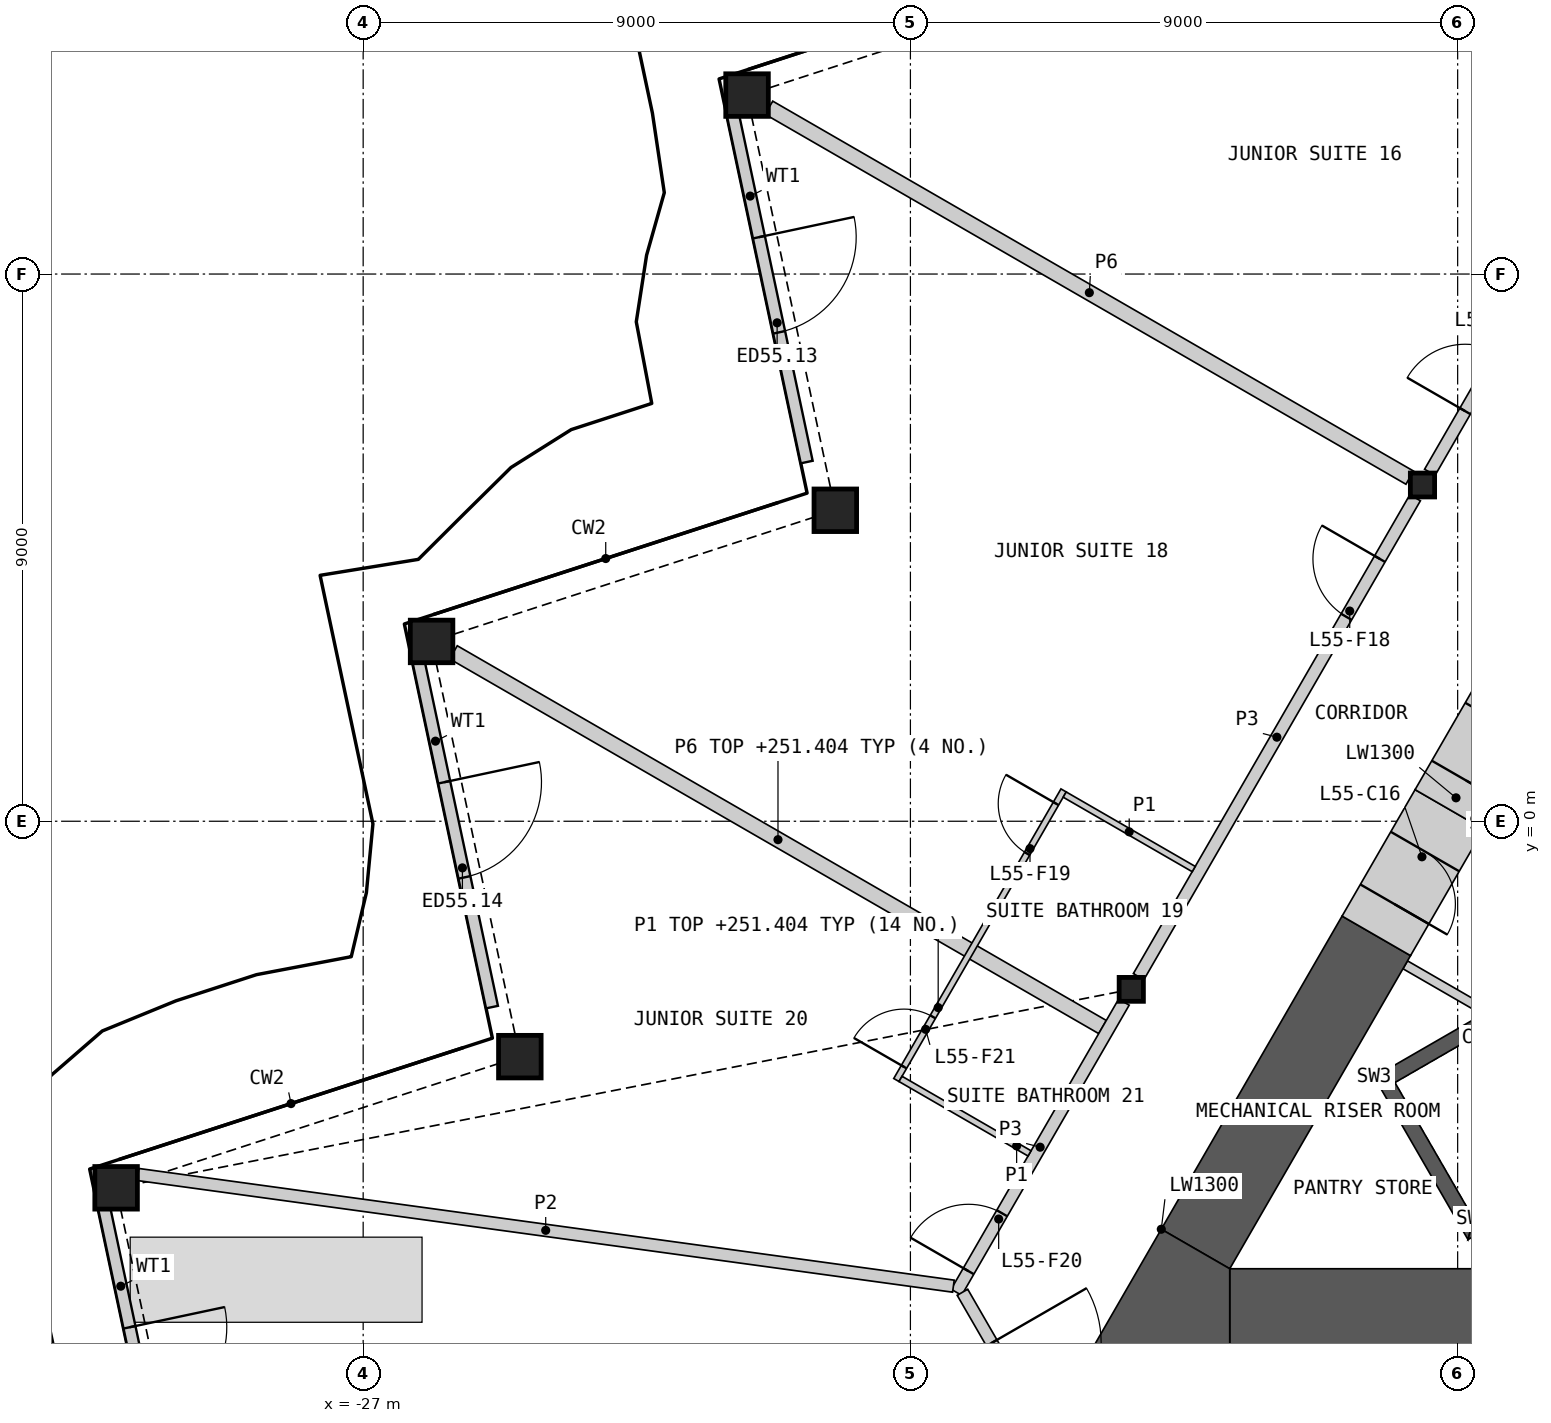
"""IFC4 building model, lengths in metres.
Left out: names, types, materials, properties, quantities, classifications, styles, units other than length and angle.
Written with IfcOpenShell. Run it as: python <this file> out.ifc"""

import sys

from ifc_helpers import new_model, si_unit, direction, frame, frame_2d, origin, origin_2d, place, context, subcontext, project, spatial, polyline, rectangle, hollow_rectangle, i_section, outline, extrude, element, fill, save


model = new_model("IFC4")
c1 = context("Model", 3, precision=1e-05, world=origin(), true_north=direction((0.0, 1.0)))
c2 = subcontext(c1, "Body", "Model", "MODEL_VIEW")
j1 = project(units=[si_unit("LENGTHUNIT", "METRE"), si_unit("PLANEANGLEUNIT", "RADIAN")], contexts=[c1])
p1 = place(None, origin())
s1 = spatial("IfcSite", under=j1, at=p1, CompositionType="ELEMENT")
p2 = place(p1, origin())
s2 = spatial("IfcBuilding", under=s1, at=p2, CompositionType="ELEMENT")
p3 = place(p2, frame((0.0, 0.0, 249.0)))
s3 = spatial("IfcBuildingStorey", under=s2, at=p3, CompositionType="ELEMENT", Elevation=249.0)
for number, where, z_axis, x_axis in (
    (1, (-20.687, 11.943, 0.0), (0.0, 0.0, 1.0), (1.0, 0.0, 0.0)),
    (2, (-19.235, 5.115, 0.0), (0.0, 0.0, 1.0), (1.0, 0.0, 0.0)),
    (3, (-25.875, 2.957, 0.0), (0.0, 0.0, 1.0), (1.0, 0.0, 0.0)),
    (4, (-24.423, -3.872, 0.0), (0.0, 0.0, 1.0), (1.0, 0.0, 0.0)),
    (5, (-31.063, -6.029, 0.0), (0.0, 0.0, 1.0), (1.0, 0.0, 0.0)),
):
    element("IfcColumn", number, at=place(p3, frame(where, z_axis=z_axis, x_axis=x_axis)), inside=s3, PredefinedType="COLUMN", context=c2, shape_type="SweptSolid", body=[
        extrude(hollow_rectangle(XDim=0.7, YDim=0.7, WallThickness=0.045, at=origin_2d()), origin(), (0.0, 0.0, 1.0), 3.6),
    ])
for number, where, z_axis, x_axis in (
    (6, (-9.578, 5.53, 0.0), (0.0, 0.0, 1.0), (1.0, 0.0, 0.0)),
    (7, (-14.368, -2.765, 0.0), (0.0, 0.0, 1.0), (1.0, 0.0, 0.0)),
):
    element("IfcColumn", number, at=place(p3, frame(where, z_axis=z_axis, x_axis=x_axis)), inside=s3, PredefinedType="COLUMN", context=c2, shape_type="SweptSolid", body=[
        extrude(i_section(OverallWidth=0.399, OverallDepth=0.393, WebThickness=0.023, FlangeThickness=0.037, at=origin_2d()), origin(), (0.0, 0.0, 1.0), 3.6),
    ])
p4 = place(p3, frame((-20.945, 11.74, 0.0), z_axis=(0.0, 0.0, 1.0), x_axis=(0.207920947907, -0.978145633033, 0.0)))
e8 = element("IfcWall", 8, at=p4, inside=s3, PredefinedType="SOLIDWALL", context=c2, shape_type="SweptSolid", body=[
    extrude(rectangle(XDim=5.963, YDim=0.2, at=frame_2d((2.981, 0.0))), origin(), (0.0, 0.0, 1.0), 2.701),
])
p5 = place(p4, frame((2.181, 0.0, 0.0)))
e9 = element("IfcOpeningElement", 9, at=p5, cuts=e8, PredefinedType="OPENING", context=c2, shape_type="SweptSolid", body=[
    extrude(rectangle(XDim=1.6, YDim=2.4, at=frame_2d((0.8, 1.2))), frame((0.0, 0.11, 0.0), z_axis=(0.0, -1.0, 0.0), x_axis=(1.0, 0.0, 0.0)), (0.0, 0.0, 1.0), 0.22),
])
p6 = place(p3, frame((-26.121, 2.775, 0.0), z_axis=(0.0, 0.0, 1.0), x_axis=(0.207881772083, -0.978153959679, 0.0)))
e10 = element("IfcWall", 10, at=p6, inside=s3, PredefinedType="SOLIDWALL", context=c2, shape_type="SweptSolid", body=[
    extrude(rectangle(XDim=5.963, YDim=0.2, at=frame_2d((2.981, 0.0))), origin(), (0.0, 0.0, 1.0), 2.701),
])
p7 = place(p6, frame((2.181, 0.0, 0.0)))
e11 = element("IfcOpeningElement", 11, at=p7, cuts=e10, PredefinedType="OPENING", context=c2, shape_type="SweptSolid", body=[
    extrude(rectangle(XDim=1.6, YDim=2.4, at=frame_2d((0.8, 1.2))), frame((0.0, 0.11, 0.0), z_axis=(0.0, -1.0, 0.0), x_axis=(1.0, 0.0, 0.0)), (0.0, 0.0, 1.0), 0.22),
])
p8 = place(p3, frame((-31.296, -6.189, 0.0), z_axis=(0.0, 0.0, 1.0), x_axis=(0.207920947907, -0.978145633033, 0.0)))
e12 = element("IfcWall", 12, at=p8, inside=s3, PredefinedType="SOLIDWALL", context=c2, shape_type="SweptSolid", body=[
    extrude(rectangle(XDim=5.963, YDim=0.2, at=frame_2d((2.981, 0.0))), origin(), (0.0, 0.0, 1.0), 2.701),
])
p9 = place(p8, frame((2.181, 0.0, 0.0)))
e13 = element("IfcOpeningElement", 13, at=p9, cuts=e12, PredefinedType="OPENING", context=c2, shape_type="SweptSolid", body=[
    extrude(rectangle(XDim=1.6, YDim=2.4, at=frame_2d((0.8, 1.2))), frame((0.0, 0.11, 0.0), z_axis=(0.0, -1.0, 0.0), x_axis=(1.0, 0.0, 0.0)), (0.0, 0.0, 1.0), 0.22),
])
p10 = place(p3, origin())
e14 = element("IfcWall", 14, at=p10, inside=s3, PredefinedType="SHEAR", context=c2, shape_type="SweptSolid", body=[
    extrude(outline(polyline([(-5.307, -1.281), (-10.374, -4.206), (-10.032, -4.298), (-5.182, -1.498), (-5.307, -1.281)])), origin(), (0.0, 0.0, 1.0), 3.25),
])
p11 = place(p3, origin())
e15 = element("IfcWall", 15, at=p11, inside=s3, PredefinedType="SHEAR", context=c2, shape_type="SweptSolid", body=[
    extrude(outline(polyline([(-10.374, -4.206), (-8.83, -6.881), (-8.738, -6.539), (-10.032, -4.298), (-10.374, -4.206)])), origin(), (0.0, 0.0, 1.0), 3.25),
])
p12 = place(p3, origin())
e16 = element("IfcWall", 16, at=p12, inside=s3, PredefinedType="SHEAR", context=c2, shape_type="SweptSolid", body=[
    extrude(outline(polyline([(-8.738, -6.539), (-8.83, -6.881), (-3.763, -3.956), (-3.888, -3.739), (-8.738, -6.539)])), origin(), (0.0, 0.0, 1.0), 3.25),
])
p13 = place(p3, frame((-9.862, -2.361, 0.0), z_axis=(0.0, 0.0, 1.0), x_axis=(0.865990094875, -0.500061151839, 0.0)))
e17 = element("IfcWall", 17, at=p13, inside=s3, PredefinedType="PARTITIONING", context=c2, shape_type="SweptSolid", body=[
    extrude(rectangle(XDim=1.56, YDim=0.15, at=frame_2d((0.78, 0.0))), origin(), (0.0, 0.0, 1.0), 3.25),
])
p14 = place(p3, frame((-12.748, -8.01, 0.0), z_axis=(0.0, 0.0, 1.0), x_axis=(1.0, 0.0, 0.0)))
e18 = element("IfcWall", 18, at=p14, inside=s3, PredefinedType="SHEAR", context=c2, shape_type="SweptSolid", body=[
    extrude(rectangle(XDim=4.26, YDim=1.3, at=frame_2d((2.13, 0.0))), origin(), (0.0, 0.0, 1.0), 3.25),
])
p15 = place(p3, frame((-10.338, -1.885, 0.0), z_axis=(0.0, 0.0, 1.0), x_axis=(-0.499975944838, -0.866039291593, 0.0)))
e19 = element("IfcWall", 19, at=p15, inside=s3, PredefinedType="SHEAR", context=c2, shape_type="SweptSolid", body=[
    extrude(rectangle(XDim=5.947, YDim=1.3, at=frame_2d((2.974, 0.0))), origin(), (0.0, 0.0, 1.0), 3.25),
])
p16 = place(p3, origin())
e20 = element("IfcWall", 20, at=p16, inside=s3, PredefinedType="SHEAR", context=c2, shape_type="SweptSolid", body=[
    extrude(outline(polyline([(-13.874, -6.71), (-12.748, -7.36), (-12.748, -8.66), (-15.0, -8.66), (-13.874, -6.71)])), origin(), (0.0, 0.0, 1.0), 3.25),
])
p17 = place(p3, frame((-9.137, 0.195, 0.0), z_axis=(0.0, 0.0, 1.0), x_axis=(-0.500009943768, -0.866019662671, 0.0)))
e21 = element("IfcWall", 21, at=p17, inside=s3, PredefinedType="SHEAR", context=c2, shape_type="SweptSolid", body=[
    extrude(rectangle(XDim=2.401, YDim=1.3, at=frame_2d((1.201, 0.0))), origin(), (0.0, 0.0, 1.0), 3.25),
])
p18 = place(p17, frame((0.8, 0.0, 0.0)))
e22 = element("IfcOpeningElement", 22, at=p18, cuts=e21, PredefinedType="OPENING", context=c2, shape_type="SweptSolid", body=[
    extrude(rectangle(XDim=1.0, YDim=2.1, at=frame_2d((0.5, 1.05))), frame((0.0, 0.66, 0.0), z_axis=(0.0, -1.0, 0.0), x_axis=(1.0, 0.0, 0.0)), (0.0, 0.0, 1.0), 1.32),
])
p19 = place(p3, frame((-8.037, 2.1, 0.0), z_axis=(0.0, 0.0, 1.0), x_axis=(-0.50002983664, -0.866008176907, 0.0)))
e23 = element("IfcWall", 23, at=p19, inside=s3, PredefinedType="SHEAR", context=c2, shape_type="SweptSolid", body=[
    extrude(rectangle(XDim=2.2, YDim=1.3, at=frame_2d((1.1, 0.0))), origin(), (0.0, 0.0, 1.0), 3.25),
])
p20 = place(p19, frame((0.55, 0.0, 0.0)))
e24 = element("IfcOpeningElement", 24, at=p20, cuts=e23, PredefinedType="OPENING", context=c2, shape_type="SweptSolid", body=[
    extrude(rectangle(XDim=1.1, YDim=2.1, at=frame_2d((0.55, 1.05))), frame((0.0, 0.66, 0.0), z_axis=(0.0, -1.0, 0.0), x_axis=(1.0, 0.0, 0.0)), (0.0, 0.0, 1.0), 1.32),
])
p21 = place(p3, frame((-25.515, 2.778, 0.0), z_axis=(0.0, 0.0, 1.0), x_axis=(0.866019666699, -0.500009936792, 0.0)))
e25 = element("IfcWall", 25, at=p21, inside=s3, PredefinedType="PARTITIONING", context=c2, shape_type="SweptSolid", body=[
    extrude(rectangle(XDim=12.325, YDim=0.25, at=frame_2d((6.163, 0.0))), origin(), (0.0, 0.0, 1.0), 2.404),
])
p22 = place(p3, frame((-20.327, 11.736, 0.0), z_axis=(0.0, 0.0, 1.0), x_axis=(0.866024549986, -0.50000147882, 0.0)))
e26 = element("IfcWall", 26, at=p22, inside=s3, PredefinedType="PARTITIONING", context=c2, shape_type="SweptSolid", body=[
    extrude(rectangle(XDim=12.169, YDim=0.25, at=frame_2d((6.084, 0.0))), origin(), (0.0, 0.0, 1.0), 2.404),
])
p23 = place(p3, frame((-14.247, -2.556, 0.0), z_axis=(0.0, 0.0, 1.0), x_axis=(0.49998193945, 0.866035830797, 0.0)))
e27 = element("IfcWall", 27, at=p23, inside=s3, PredefinedType="PARTITIONING", context=c2, shape_type="SweptSolid", body=[
    extrude(rectangle(XDim=9.094, YDim=0.2, at=frame_2d((4.547, 0.0))), origin(), (0.0, 0.0, 1.0), 3.25),
])
p24 = place(p23, frame((6.833, 0.0, 0.0)))
e28 = element("IfcOpeningElement", 28, at=p24, cuts=e27, PredefinedType="OPENING", context=c2, shape_type="SweptSolid", body=[
    extrude(rectangle(XDim=1.1, YDim=2.1, at=frame_2d((0.55, 1.05))), frame((0.0, 0.11, 0.0), z_axis=(0.0, -1.0, 0.0), x_axis=(1.0, 0.0, 0.0)), (0.0, 0.0, 1.0), 0.22),
])
p25 = place(p3, frame((-9.458, 5.74, 0.0), z_axis=(0.0, 0.0, 1.0), x_axis=(0.50000207303, 0.866024206917, 0.0)))
e29 = element("IfcWall", 29, at=p25, inside=s3, PredefinedType="PARTITIONING", context=c2, shape_type="SweptSolid", body=[
    extrude(rectangle(XDim=9.095, YDim=0.2, at=frame_2d((4.547, 0.0))), origin(), (0.0, 0.0, 1.0), 3.25),
])
p26 = place(p25, frame((1.162, 0.0, 0.0)))
e30 = element("IfcOpeningElement", 30, at=p26, cuts=e29, PredefinedType="OPENING", context=c2, shape_type="SweptSolid", body=[
    extrude(rectangle(XDim=1.1, YDim=2.1, at=frame_2d((0.55, 1.05))), frame((0.0, 0.11, 0.0), z_axis=(0.0, -1.0, 0.0), x_axis=(1.0, 0.0, 0.0)), (0.0, 0.0, 1.0), 0.22),
])
p27 = place(p3, frame((-17.244, -7.747, 0.0), z_axis=(0.0, 0.0, 1.0), x_axis=(0.500017753321, 0.866015153657, 0.0)))
e31 = element("IfcWall", 31, at=p27, inside=s3, PredefinedType="PARTITIONING", context=c2, shape_type="SweptSolid", body=[
    extrude(rectangle(XDim=5.51, YDim=0.2, at=frame_2d((2.755, 0.0))), origin(), (0.0, 0.0, 1.0), 3.25),
])
p28 = place(p27, frame((0.401, 0.0, 0.0)))
e32 = element("IfcOpeningElement", 32, at=p28, cuts=e31, PredefinedType="OPENING", context=c2, shape_type="SweptSolid", body=[
    extrude(rectangle(XDim=1.1, YDim=2.1, at=frame_2d((0.55, 1.05))), frame((0.0, 0.11, 0.0), z_axis=(0.0, -1.0, 0.0), x_axis=(1.0, 0.0, 0.0)), (0.0, 0.0, 1.0), 0.22),
])
p29 = place(p3, frame((-17.144, -7.747, 0.0), z_axis=(0.0, 0.0, 1.0), x_axis=(0.499961815444, -0.866047448526, 0.0)))
e33 = element("IfcWall", 33, at=p29, inside=s3, PredefinedType="PARTITIONING", context=c2, shape_type="SweptSolid", body=[
    extrude(rectangle(XDim=3.826, YDim=0.2, at=frame_2d((1.913, 0.0))), origin(), (0.0, 0.0, 1.0), 3.25),
])
p30 = place(p29, frame((0.962, 0.0, 0.0)))
e34 = element("IfcOpeningElement", 34, at=p30, cuts=e33, PredefinedType="OPENING", context=c2, shape_type="SweptSolid", body=[
    extrude(rectangle(XDim=1.8, YDim=2.1, at=frame_2d((0.9, 1.05))), frame((0.0, 0.11, 0.0), z_axis=(0.0, -1.0, 0.0), x_axis=(1.0, 0.0, 0.0)), (0.0, 0.0, 1.0), 0.22),
])
p31 = place(p3, frame((-30.703, -5.81, 0.0), z_axis=(0.0, 0.0, 1.0), x_axis=(0.99075075074, -0.135694325259, 0.0)))
e35 = element("IfcWall", 35, at=p31, inside=s3, PredefinedType="PARTITIONING", context=c2, shape_type="SweptSolid", body=[
    extrude(rectangle(XDim=13.535, YDim=0.2, at=frame_2d((6.768, 0.0))), origin(), (0.0, 0.0, 1.0), 2.404),
])
p32 = place(p3, frame((-18.231, -4.256, 0.0), z_axis=(0.0, 0.0, 1.0), x_axis=(0.500015767406, 0.866016300277, 0.0)))
e36 = element("IfcWall", 36, at=p32, inside=s3, PredefinedType="PARTITIONING", context=c2, shape_type="SweptSolid", body=[
    extrude(rectangle(XDim=5.5, YDim=0.1, at=frame_2d((2.75, 0.0))), origin(), (0.0, 0.0, 1.0), 2.404),
])
p33 = place(p32, frame((4.3, 0.0, 0.0)))
e37 = element("IfcOpeningElement", 37, at=p33, cuts=e36, PredefinedType="OPENING", context=c2, shape_type="SweptSolid", body=[
    extrude(rectangle(XDim=0.95, YDim=2.1, at=frame_2d((0.475, 1.05))), frame((0.0, 0.06, 0.0), z_axis=(0.0, -1.0, 0.0), x_axis=(1.0, 0.0, 0.0)), (0.0, 0.0, 1.0), 0.12),
])
p34 = place(p32, frame((0.25, 0.0, 0.0)))
e38 = element("IfcOpeningElement", 38, at=p34, cuts=e36, PredefinedType="OPENING", context=c2, shape_type="SweptSolid", body=[
    extrude(rectangle(XDim=0.95, YDim=2.1, at=frame_2d((0.475, 1.05))), frame((0.0, 0.06, 0.0), z_axis=(0.0, -1.0, 0.0), x_axis=(1.0, 0.0, 0.0)), (0.0, 0.0, 1.0), 0.12),
])
p35 = place(p3, frame((-15.462, 0.439, 0.0), z_axis=(0.0, 0.0, 1.0), x_axis=(0.865989751695, -0.500061746146, 0.0)))
e39 = element("IfcWall", 39, at=p35, inside=s3, PredefinedType="PARTITIONING", context=c2, shape_type="SweptSolid", body=[
    extrude(rectangle(XDim=2.45, YDim=0.1, at=frame_2d((1.225, 0.0))), origin(), (0.0, 0.0, 1.0), 2.404),
])
p36 = place(p3, frame((-18.163, -4.238, 0.0), z_axis=(0.0, 0.0, 1.0), x_axis=(0.866014668023, -0.500018594424, 0.0)))
e40 = element("IfcWall", 40, at=p36, inside=s3, PredefinedType="PARTITIONING", context=c2, shape_type="SweptSolid", body=[
    extrude(rectangle(XDim=2.45, YDim=0.1, at=frame_2d((1.225, 0.0))), origin(), (0.0, 0.0, 1.0), 2.404),
])
p37 = place(p5, origin())
e41 = element("IfcDoor", 41, at=p37, inside=s3, OperationType="DOUBLE_DOOR_SINGLE_SWING", PredefinedType="DOOR", context=c2, shape_type="SweptSolid", body=[
    extrude(rectangle(XDim=1.6, YDim=2.4, at=frame_2d((0.8, 1.2))), frame((0.0, 0.025, 0.0), z_axis=(0.0, -1.0, 0.0), x_axis=(1.0, 0.0, 0.0)), (0.0, 0.0, 1.0), 0.05),
])
fill(e9, e41)
p38 = place(p7, origin())
e42 = element("IfcDoor", 42, at=p38, inside=s3, OperationType="DOUBLE_DOOR_SINGLE_SWING", PredefinedType="DOOR", context=c2, shape_type="SweptSolid", body=[
    extrude(rectangle(XDim=1.6, YDim=2.4, at=frame_2d((0.8, 1.2))), frame((0.0, 0.025, 0.0), z_axis=(0.0, -1.0, 0.0), x_axis=(1.0, 0.0, 0.0)), (0.0, 0.0, 1.0), 0.05),
])
fill(e11, e42)
p39 = place(p9, origin())
e43 = element("IfcDoor", 43, at=p39, inside=s3, OperationType="DOUBLE_DOOR_SINGLE_SWING", PredefinedType="DOOR", context=c2, shape_type="SweptSolid", body=[
    extrude(rectangle(XDim=1.6, YDim=2.4, at=frame_2d((0.8, 1.2))), frame((0.0, 0.025, 0.0), z_axis=(0.0, -1.0, 0.0), x_axis=(1.0, 0.0, 0.0)), (0.0, 0.0, 1.0), 0.05),
])
fill(e13, e43)
p40 = place(p18, origin())
e44 = element("IfcDoor", 44, at=p40, inside=s3, OperationType="SINGLE_SWING_RIGHT", PredefinedType="DOOR", context=c2, shape_type="SweptSolid", body=[
    extrude(rectangle(XDim=1.0, YDim=2.1, at=frame_2d((0.5, 1.05))), frame((0.0, 0.405, 0.0), z_axis=(0.0, -1.0, 0.0), x_axis=(1.0, 0.0, 0.0)), (0.0, 0.0, 1.0), 0.05),
])
fill(e22, e44)
p41 = place(p26, origin())
e45 = element("IfcDoor", 45, at=p41, inside=s3, OperationType="SINGLE_SWING_LEFT", PredefinedType="DOOR", context=c2, shape_type="SweptSolid", body=[
    extrude(rectangle(XDim=1.1, YDim=2.1, at=frame_2d((0.55, 1.05))), frame((0.0, 0.025, 0.0), z_axis=(0.0, -1.0, 0.0), x_axis=(1.0, 0.0, 0.0)), (0.0, 0.0, 1.0), 0.05),
])
fill(e30, e45)
p42 = place(p24, origin())
e46 = element("IfcDoor", 46, at=p42, inside=s3, OperationType="SINGLE_SWING_RIGHT", PredefinedType="DOOR", context=c2, shape_type="SweptSolid", body=[
    extrude(rectangle(XDim=1.1, YDim=2.1, at=frame_2d((0.55, 1.05))), frame((0.0, 0.025, 0.0), z_axis=(0.0, -1.0, 0.0), x_axis=(1.0, 0.0, 0.0)), (0.0, 0.0, 1.0), 0.05),
])
fill(e28, e46)
p43 = place(p33, origin())
e47 = element("IfcDoor", 47, at=p43, inside=s3, OperationType="SINGLE_SWING_RIGHT", PredefinedType="DOOR", context=c2, shape_type="SweptSolid", body=[
    extrude(rectangle(XDim=0.95, YDim=2.1, at=frame_2d((0.475, 1.05))), frame((0.0, 0.025, 0.0), z_axis=(0.0, -1.0, 0.0), x_axis=(1.0, 0.0, 0.0)), (0.0, 0.0, 1.0), 0.05),
])
fill(e37, e47)
p44 = place(p28, origin())
e48 = element("IfcDoor", 48, at=p44, inside=s3, OperationType="SINGLE_SWING_LEFT", PredefinedType="DOOR", context=c2, shape_type="SweptSolid", body=[
    extrude(rectangle(XDim=1.1, YDim=2.1, at=frame_2d((0.55, 1.05))), frame((0.0, 0.025, 0.0), z_axis=(0.0, -1.0, 0.0), x_axis=(1.0, 0.0, 0.0)), (0.0, 0.0, 1.0), 0.05),
])
fill(e32, e48)
p45 = place(p34, origin())
e49 = element("IfcDoor", 49, at=p45, inside=s3, OperationType="SINGLE_SWING_LEFT", PredefinedType="DOOR", context=c2, shape_type="SweptSolid", body=[
    extrude(rectangle(XDim=0.95, YDim=2.1, at=frame_2d((0.475, 1.05))), frame((0.0, 0.025, 0.0), z_axis=(0.0, -1.0, 0.0), x_axis=(1.0, 0.0, 0.0)), (0.0, 0.0, 1.0), 0.05),
])
fill(e38, e49)
p46 = place(p30, origin())
e50 = element("IfcDoor", 50, at=p46, inside=s3, OperationType="DOUBLE_DOOR_SINGLE_SWING", PredefinedType="DOOR", context=c2, shape_type="SweptSolid", body=[
    extrude(rectangle(XDim=1.8, YDim=2.1, at=frame_2d((0.9, 1.05))), frame((0.0, 0.025, 0.0), z_axis=(0.0, -1.0, 0.0), x_axis=(1.0, 0.0, 0.0)), (0.0, 0.0, 1.0), 0.05),
])
fill(e34, e50)
save(model, sys.argv[1])
